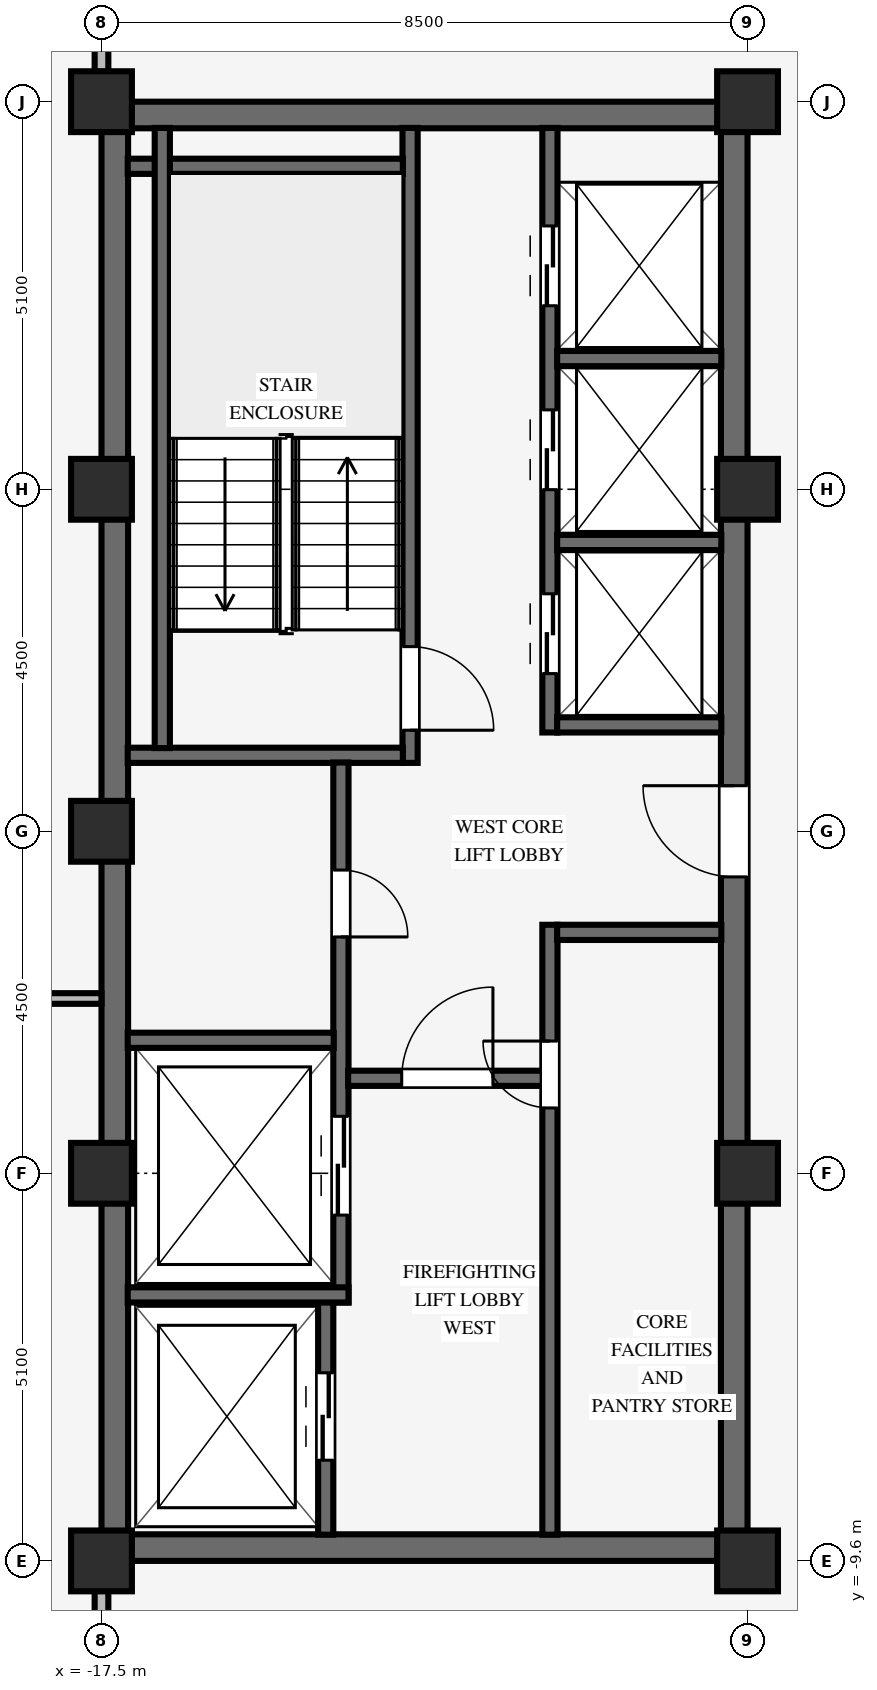
"""IFC4 building model, lengths in metres.
Left out: names, types, materials, properties, quantities, classifications, styles, units other than length and angle.
Written with IfcOpenShell. Run it as: python <this file> out.ifc"""

import sys

from ifc_helpers import new_model, si_unit, direction, frame, frame_2d, origin, origin_2d, place, context, subcontext, project, spatial, rectangle, extrude, source, transform, mapped, element, fill, save


model = new_model("IFC4")
c1 = context("Model", 3, precision=1e-05, world=origin(), true_north=direction((0.0, 1.0)))
c2 = subcontext(c1, "Body", "Model", "MODEL_VIEW")
j1 = project(units=[si_unit("LENGTHUNIT", "METRE"), si_unit("PLANEANGLEUNIT", "RADIAN")], contexts=[c1])
p1 = place(None, origin())
s1 = spatial("IfcSite", under=j1, at=p1, CompositionType="ELEMENT")
p2 = place(p1, origin())
s2 = spatial("IfcBuilding", under=s1, at=p2, CompositionType="ELEMENT")
p3 = place(p2, frame((0.0, 0.0, 231.05)))
s3 = spatial("IfcBuildingStorey", under=s2, at=p3, CompositionType="ELEMENT", Elevation=231.05)
for number, where, z_axis, x_axis in (
    (1, (-17.5, -9.425, 0.0), (0.0, 0.0, 1.0), (1.0, 0.0, 0.0)),
    (2, (-17.5, 9.425, 0.0), (0.0, 0.0, 1.0), (1.0, 0.0, 0.0)),
):
    element("IfcWall", number, at=place(p3, frame(where, z_axis=z_axis, x_axis=x_axis)), inside=s3, PredefinedType="SHEAR", context=c2, shape_type="SweptSolid", body=[
        extrude(rectangle(XDim=8.5, YDim=0.35, at=frame_2d((4.25, 0.0))), origin(), (0.0, 0.0, 1.0), 3.37),
    ])
p4 = place(p3, frame((-17.325, -9.255, 0.0), z_axis=(0.0, 0.0, 1.0), x_axis=(0.0, 1.0, 0.0)))
e3 = element("IfcWall", 3, at=p4, inside=s3, PredefinedType="SHEAR", context=c2, shape_type="SweptSolid", body=[
    extrude(rectangle(XDim=18.51, YDim=0.35, at=frame_2d((9.255, 0.0))), origin(), (0.0, 0.0, 1.0), 3.37),
])
p5 = place(p3, frame((-9.175, -9.255, 0.0), z_axis=(0.0, 0.0, 1.0), x_axis=(0.0, 1.0, 0.0)))
e4 = element("IfcWall", 4, at=p5, inside=s3, PredefinedType="SHEAR", context=c2, shape_type="SweptSolid", body=[
    extrude(rectangle(XDim=18.51, YDim=0.35, at=frame_2d((9.255, 0.0))), origin(), (0.0, 0.0, 1.0), 3.37),
])
p6 = place(p5, frame((8.655, 0.0, 0.0)))
e5 = element("IfcOpeningElement", 5, at=p6, cuts=e4, PredefinedType="OPENING", context=c2, shape_type="SweptSolid", body=[
    extrude(rectangle(XDim=1.2, YDim=2.15, at=frame_2d((0.6, 1.075))), frame((0.0, 0.185, 0.0), z_axis=(0.0, -1.0, 0.0), x_axis=(1.0, 0.0, 0.0)), (0.0, 0.0, 1.0), 0.37),
])
for number, where, z_axis, x_axis in (
    (6, (-17.5, -9.6, 0.0), (0.0, 0.0, 1.0), (1.0, 0.0, 0.0)),
    (7, (-17.5, -4.5, 0.0), (0.0, 0.0, 1.0), (1.0, 0.0, 0.0)),
    (8, (-17.5, 4.5, 0.0), (0.0, 0.0, 1.0), (1.0, 0.0, 0.0)),
    (9, (-17.5, 9.6, 0.0), (0.0, 0.0, 1.0), (1.0, 0.0, 0.0)),
    (10, (-9.0, -9.6, 0.0), (0.0, 0.0, 1.0), (1.0, 0.0, 0.0)),
    (11, (-9.0, -4.5, 0.0), (0.0, 0.0, 1.0), (1.0, 0.0, 0.0)),
    (12, (-9.0, 4.5, 0.0), (0.0, 0.0, 1.0), (1.0, 0.0, 0.0)),
    (13, (-9.0, 9.6, 0.0), (0.0, 0.0, 1.0), (1.0, 0.0, 0.0)),
    (14, (-17.5, 0.0, 0.0), (0.0, 0.0, 1.0), (1.0, 0.0, 0.0)),
):
    element("IfcColumn", number, at=place(p3, frame(where, z_axis=z_axis, x_axis=x_axis)), inside=s3, PredefinedType="COLUMN", context=c2, shape_type="SweptSolid", body=[
        extrude(rectangle(XDim=0.8, YDim=0.8, at=origin_2d()), origin(), (0.0, 0.0, 1.0), 3.37),
    ])
p7 = place(p3, frame((-13.44, 0.9, 0.0), z_axis=(0.0, 0.0, 1.0), x_axis=(0.0, 1.0, 0.0)))
e15 = element("IfcWall", 15, at=p7, inside=s3, PredefinedType="SHEAR", context=c2, shape_type="SweptSolid", body=[
    extrude(rectangle(XDim=8.355, YDim=0.2, at=frame_2d((4.177, 0.0))), origin(), (0.0, 0.0, 1.0), 3.37),
])
p8 = place(p7, frame((1.53, 0.0, 0.0), z_axis=(0.0, 0.0, 1.0), x_axis=(-1.0, 0.0, 0.0)))
e16 = element("IfcOpeningElement", 16, at=p8, cuts=e15, PredefinedType="OPENING", context=c2, shape_type="SweptSolid", body=[
    extrude(rectangle(XDim=1.1, YDim=2.15, at=frame_2d((0.55, 1.075))), frame((0.0, 0.11, 0.0), z_axis=(0.0, -1.0, 0.0), x_axis=(1.0, 0.0, 0.0)), (0.0, 0.0, 1.0), 0.22),
])
for number, where, z_axis, x_axis in (
    (17, (-17.155, 1.0, 0.0), (0.0, 0.0, 1.0), (1.0, 0.0, 0.0)),
    (18, (-17.155, 8.75, 0.0), (0.0, 0.0, 1.0), (1.0, 0.0, 0.0)),
):
    element("IfcWall", number, at=place(p3, frame(where, z_axis=z_axis, x_axis=x_axis)), inside=s3, PredefinedType="SHEAR", context=c2, shape_type="SweptSolid", body=[
        extrude(rectangle(XDim=3.62, YDim=0.2, at=frame_2d((1.81, 0.0))), origin(), (0.0, 0.0, 1.0), 3.37),
    ])
p9 = place(p3, frame((-16.7, 1.095, 0.0), z_axis=(0.0, 0.0, 1.0), x_axis=(0.0, 1.0, 0.0)))
e19 = element("IfcWall", 19, at=p9, inside=s3, PredefinedType="SHEAR", context=c2, shape_type="SweptSolid", body=[
    extrude(rectangle(XDim=8.16, YDim=0.2, at=frame_2d((4.08, 0.0))), origin(), (0.0, 0.0, 1.0), 3.37),
])
p10 = place(p3, frame((-14.55, -9.255, 0.0), z_axis=(0.0, 0.0, 1.0), x_axis=(0.0, 1.0, 0.0)))
e20 = element("IfcWall", 20, at=p10, inside=s3, PredefinedType="SHEAR", context=c2, shape_type="SweptSolid", body=[
    extrude(rectangle(XDim=3.06, YDim=0.2, at=frame_2d((1.53, 0.0))), origin(), (0.0, 0.0, 1.0), 3.37),
])
p11 = place(p10, frame((0.98, 0.0, 0.0)))
e21 = element("IfcOpeningElement", 21, at=p11, cuts=e20, PredefinedType="OPENING", context=c2, shape_type="SweptSolid", body=[
    extrude(rectangle(XDim=1.15, YDim=2.15, at=frame_2d((0.575, 1.075))), frame((0.0, 0.11, 0.0), z_axis=(0.0, -1.0, 0.0), x_axis=(1.0, 0.0, 0.0)), (0.0, 0.0, 1.0), 0.22),
])
p12 = place(p3, frame((-14.35, -6.2, 0.0), z_axis=(0.0, 0.0, 1.0), x_axis=(0.0, 1.0, 0.0)))
e22 = element("IfcWall", 22, at=p12, inside=s3, PredefinedType="SHEAR", context=c2, shape_type="SweptSolid", body=[
    extrude(rectangle(XDim=7.105, YDim=0.2, at=frame_2d((3.552, 0.0))), origin(), (0.0, 0.0, 1.0), 3.37),
])
p13 = place(p12, frame((5.69, 0.0, 0.0), z_axis=(0.0, 0.0, 1.0), x_axis=(-1.0, 0.0, 0.0)))
e23 = element("IfcOpeningElement", 23, at=p13, cuts=e22, PredefinedType="OPENING", context=c2, shape_type="SweptSolid", body=[
    extrude(rectangle(XDim=0.88, YDim=2.1, at=frame_2d((0.44, 1.05))), frame((0.0, 0.11, 0.0), z_axis=(0.0, -1.0, 0.0), x_axis=(1.0, 0.0, 0.0)), (0.0, 0.0, 1.0), 0.22),
])
p14 = place(p12, frame((1.15, 0.0, 0.0)))
e24 = element("IfcOpeningElement", 24, at=p14, cuts=e22, PredefinedType="OPENING", context=c2, shape_type="SweptSolid", body=[
    extrude(rectangle(XDim=1.3, YDim=2.2, at=frame_2d((0.65, 1.1))), frame((0.0, 0.11, 0.0), z_axis=(0.0, -1.0, 0.0), x_axis=(1.0, 0.0, 0.0)), (0.0, 0.0, 1.0), 0.22),
])
p15 = place(p3, frame((-17.155, -6.1, 0.0), z_axis=(0.0, 0.0, 1.0), x_axis=(1.0, 0.0, 0.0)))
e25 = element("IfcWall", 25, at=p15, inside=s3, PredefinedType="SHEAR", context=c2, shape_type="SweptSolid", body=[
    extrude(rectangle(XDim=2.905, YDim=0.2, at=frame_2d((1.453, 0.0))), origin(), (0.0, 0.0, 1.0), 3.37),
])
p16 = place(p3, frame((-17.155, -2.75, 0.0), z_axis=(0.0, 0.0, 1.0), x_axis=(1.0, 0.0, 0.0)))
e26 = element("IfcWall", 26, at=p16, inside=s3, PredefinedType="SHEAR", context=c2, shape_type="SweptSolid", body=[
    extrude(rectangle(XDim=2.71, YDim=0.2, at=frame_2d((1.355, 0.0))), origin(), (0.0, 0.0, 1.0), 3.37),
])
p17 = place(p3, frame((-11.6, -9.255, 0.0), z_axis=(0.0, 0.0, 1.0), x_axis=(0.0, 1.0, 0.0)))
e27 = element("IfcWall", 27, at=p17, inside=s3, PredefinedType="SHEAR", context=c2, shape_type="SweptSolid", body=[
    extrude(rectangle(XDim=8.025, YDim=0.2, at=frame_2d((4.012, 0.0))), origin(), (0.0, 0.0, 1.0), 3.37),
])
p18 = place(p17, frame((5.615, 0.0, 0.0)))
e28 = element("IfcOpeningElement", 28, at=p18, cuts=e27, PredefinedType="OPENING", context=c2, shape_type="SweptSolid", body=[
    extrude(rectangle(XDim=0.88, YDim=2.1, at=frame_2d((0.44, 1.05))), frame((0.0, 0.11, 0.0), z_axis=(0.0, -1.0, 0.0), x_axis=(1.0, 0.0, 0.0)), (0.0, 0.0, 1.0), 0.22),
])
p19 = place(p3, frame((-14.255, -3.25, 0.0), z_axis=(0.0, 0.0, 1.0), x_axis=(1.0, 0.0, 0.0)))
e29 = element("IfcWall", 29, at=p19, inside=s3, PredefinedType="SHEAR", context=c2, shape_type="SweptSolid", body=[
    extrude(rectangle(XDim=2.56, YDim=0.2, at=frame_2d((1.28, 0.0))), origin(), (0.0, 0.0, 1.0), 3.37),
])
p20 = place(p19, frame((0.705, 0.0, 0.0)))
e30 = element("IfcOpeningElement", 30, at=p20, cuts=e29, PredefinedType="OPENING", context=c2, shape_type="SweptSolid", body=[
    extrude(rectangle(XDim=1.2, YDim=2.15, at=frame_2d((0.6, 1.075))), frame((0.0, 0.11, 0.0), z_axis=(0.0, -1.0, 0.0), x_axis=(1.0, 0.0, 0.0)), (0.0, 0.0, 1.0), 0.22),
])
p21 = place(p3, frame((-11.505, -1.33, 0.0), z_axis=(0.0, 0.0, 1.0), x_axis=(1.0, 0.0, 0.0)))
e31 = element("IfcWall", 31, at=p21, inside=s3, PredefinedType="SHEAR", context=c2, shape_type="SweptSolid", body=[
    extrude(rectangle(XDim=2.16, YDim=0.2, at=frame_2d((1.08, 0.0))), origin(), (0.0, 0.0, 1.0), 3.37),
])
p22 = place(p3, frame((-11.6, 1.3, 0.0), z_axis=(0.0, 0.0, 1.0), x_axis=(0.0, 1.0, 0.0)))
e32 = element("IfcWall", 32, at=p22, inside=s3, PredefinedType="SHEAR", context=c2, shape_type="SweptSolid", body=[
    extrude(rectangle(XDim=7.955, YDim=0.2, at=frame_2d((3.978, 0.0))), origin(), (0.0, 0.0, 1.0), 3.37),
])
p23 = place(p22, frame((0.775, 0.0, 0.0)))
e33 = element("IfcOpeningElement", 33, at=p23, cuts=e32, PredefinedType="OPENING", context=c2, shape_type="SweptSolid", body=[
    extrude(rectangle(XDim=1.05, YDim=2.15, at=frame_2d((0.525, 1.075))), frame((0.0, 0.11, 0.0), z_axis=(0.0, -1.0, 0.0), x_axis=(1.0, 0.0, 0.0)), (0.0, 0.0, 1.0), 0.22),
])
p24 = place(p22, frame((3.195, 0.0, 0.0)))
e34 = element("IfcOpeningElement", 34, at=p24, cuts=e32, PredefinedType="OPENING", context=c2, shape_type="SweptSolid", body=[
    extrude(rectangle(XDim=1.05, YDim=2.15, at=frame_2d((0.525, 1.075))), frame((0.0, 0.11, 0.0), z_axis=(0.0, -1.0, 0.0), x_axis=(1.0, 0.0, 0.0)), (0.0, 0.0, 1.0), 0.22),
])
p25 = place(p22, frame((5.615, 0.0, 0.0)))
e35 = element("IfcOpeningElement", 35, at=p25, cuts=e32, PredefinedType="OPENING", context=c2, shape_type="SweptSolid", body=[
    extrude(rectangle(XDim=1.05, YDim=2.15, at=frame_2d((0.525, 1.075))), frame((0.0, 0.11, 0.0), z_axis=(0.0, -1.0, 0.0), x_axis=(1.0, 0.0, 0.0)), (0.0, 0.0, 1.0), 0.22),
])
for number, where, z_axis, x_axis in (
    (36, (-11.505, 1.4, 0.0), (0.0, 0.0, 1.0), (1.0, 0.0, 0.0)),
    (37, (-11.505, 3.8, 0.0), (0.0, 0.0, 1.0), (1.0, 0.0, 0.0)),
    (38, (-11.505, 6.22, 0.0), (0.0, 0.0, 1.0), (1.0, 0.0, 0.0)),
):
    element("IfcWall", number, at=place(p3, frame(where, z_axis=z_axis, x_axis=x_axis)), inside=s3, PredefinedType="SHEAR", context=c2, shape_type="SweptSolid", body=[
        extrude(rectangle(XDim=2.16, YDim=0.2, at=frame_2d((1.08, 0.0))), origin(), (0.0, 0.0, 1.0), 3.37),
    ])
p26 = place(p3, frame((-26.1, -2.2, 0.0), z_axis=(0.0, 0.0, 1.0), x_axis=(1.0, 0.0, 0.0)))
e39 = element("IfcWall", 39, at=p26, inside=s3, PredefinedType="PARTITIONING", context=c2, shape_type="SweptSolid", body=[
    extrude(rectangle(XDim=8.6, YDim=0.14, at=frame_2d((4.3, 0.0))), origin(), (0.0, 0.0, 1.0), 3.36),
])
for number, where, z_axis, x_axis in (
    (40, (-17.5, -11.114, 0.0), (0.0, 0.0, 1.0), (0.0, 1.0, 0.0)),
    (41, (-17.5, 9.996, 0.0), (0.0, 0.0, 1.0), (0.0, 1.0, 0.0)),
):
    element("IfcWall", number, at=place(p3, frame(where, z_axis=z_axis, x_axis=x_axis)), inside=s3, PredefinedType="PARTITIONING", context=c2, shape_type="SweptSolid", body=[
        extrude(rectangle(XDim=1.118, YDim=0.18, at=frame_2d((0.559, 0.0))), origin(), (0.0, 0.0, 1.0), 2.892),
    ])
m1 = source(origin(), c2, "Body", "SweptSolid", [
    extrude(rectangle(XDim=1.1, YDim=2.15, at=frame_2d((0.55, 1.075))), frame((0.0, 0.025, 0.0), z_axis=(0.0, -1.0, 0.0), x_axis=(1.0, 0.0, 0.0)), (0.0, 0.0, 1.0), 0.05),
])
p27 = place(p8, origin())
e42 = element("IfcDoor", 42, at=p27, inside=s3, OperationType="SINGLE_SWING_RIGHT", PredefinedType="DOOR", context=c2, shape_type="MappedRepresentation", body=[
    mapped(m1, transform((0.0, 0.0, 0.0), scale=1.0)),
])
fill(e16, e42)
m2 = source(origin(), c2, "Body", "SweptSolid", [
    extrude(rectangle(XDim=0.88, YDim=2.1, at=frame_2d((0.44, 1.05))), frame((0.0, 0.025, 0.0), z_axis=(0.0, -1.0, 0.0), x_axis=(1.0, 0.0, 0.0)), (0.0, 0.0, 1.0), 0.05),
])
p28 = place(p13, origin())
e43 = element("IfcDoor", 43, at=p28, inside=s3, OperationType="SINGLE_SWING_RIGHT", PredefinedType="DOOR", context=c2, shape_type="MappedRepresentation", body=[
    mapped(m2, transform((0.0, 0.0, 0.0), scale=1.0)),
])
fill(e23, e43)
m3 = source(origin(), c2, "Body", "SweptSolid", [
    extrude(rectangle(XDim=1.2, YDim=2.15, at=frame_2d((0.6, 1.075))), frame((0.0, 0.025, 0.0), z_axis=(0.0, -1.0, 0.0), x_axis=(1.0, 0.0, 0.0)), (0.0, 0.0, 1.0), 0.05),
])
p29 = place(p20, origin())
e44 = element("IfcDoor", 44, at=p29, inside=s3, OperationType="SINGLE_SWING_RIGHT", PredefinedType="DOOR", context=c2, shape_type="MappedRepresentation", body=[
    mapped(m3, transform((0.0, 0.0, 0.0), scale=1.0)),
])
fill(e30, e44)
p30 = place(p18, origin())
e45 = element("IfcDoor", 45, at=p30, inside=s3, OperationType="SINGLE_SWING_RIGHT", PredefinedType="DOOR", context=c2, shape_type="MappedRepresentation", body=[
    mapped(m2, transform((0.0, 0.0, 0.0), scale=1.0)),
])
fill(e28, e45)
p31 = place(p6, origin())
e46 = element("IfcDoor", 46, at=p31, inside=s3, OperationType="SINGLE_SWING_RIGHT", PredefinedType="DOOR", context=c2, shape_type="MappedRepresentation", body=[
    mapped(m3, transform((0.0, 0.0, 0.0), scale=1.0)),
])
fill(e5, e46)
m4 = source(origin(), c2, "Body", "SweptSolid", [
    extrude(rectangle(XDim=1.15, YDim=2.15, at=frame_2d((0.575, 1.075))), frame((0.0, 0.025, 0.0), z_axis=(0.0, -1.0, 0.0), x_axis=(1.0, 0.0, 0.0)), (0.0, 0.0, 1.0), 0.05),
])
p32 = place(p11, origin())
e47 = element("IfcDoor", 47, at=p32, inside=s3, OperationType="DOUBLE_DOOR_SLIDING", PredefinedType="DOOR", context=c2, shape_type="MappedRepresentation", body=[
    mapped(m4, transform((0.0, 0.0, 0.0), scale=1.0)),
])
fill(e21, e47)
m5 = source(origin(), c2, "Body", "SweptSolid", [
    extrude(rectangle(XDim=1.3, YDim=2.2, at=frame_2d((0.65, 1.1))), frame((0.0, 0.025, 0.0), z_axis=(0.0, -1.0, 0.0), x_axis=(1.0, 0.0, 0.0)), (0.0, 0.0, 1.0), 0.05),
])
p33 = place(p14, origin())
e48 = element("IfcDoor", 48, at=p33, inside=s3, OperationType="DOUBLE_DOOR_SLIDING", PredefinedType="DOOR", context=c2, shape_type="MappedRepresentation", body=[
    mapped(m5, transform((0.0, 0.0, 0.0), scale=1.0)),
])
fill(e24, e48)
m6 = source(origin(), c2, "Body", "SweptSolid", [
    extrude(rectangle(XDim=1.05, YDim=2.15, at=frame_2d((0.525, 1.075))), frame((0.0, 0.025, 0.0), z_axis=(0.0, -1.0, 0.0), x_axis=(1.0, 0.0, 0.0)), (0.0, 0.0, 1.0), 0.05),
])
p34 = place(p23, origin())
e49 = element("IfcDoor", 49, at=p34, inside=s3, OperationType="DOUBLE_DOOR_SLIDING", PredefinedType="DOOR", context=c2, shape_type="MappedRepresentation", body=[
    mapped(m6, transform((0.0, 0.0, 0.0), scale=1.0)),
])
fill(e33, e49)
p35 = place(p24, origin())
e50 = element("IfcDoor", 50, at=p35, inside=s3, OperationType="DOUBLE_DOOR_SLIDING", PredefinedType="DOOR", context=c2, shape_type="MappedRepresentation", body=[
    mapped(m6, transform((0.0, 0.0, 0.0), scale=1.0)),
])
fill(e34, e50)
p36 = place(p25, origin())
e51 = element("IfcDoor", 51, at=p36, inside=s3, OperationType="DOUBLE_DOOR_SLIDING", PredefinedType="DOOR", context=c2, shape_type="MappedRepresentation", body=[
    mapped(m6, transform((0.0, 0.0, 0.0), scale=1.0)),
])
fill(e35, e51)
save(model, sys.argv[1])
